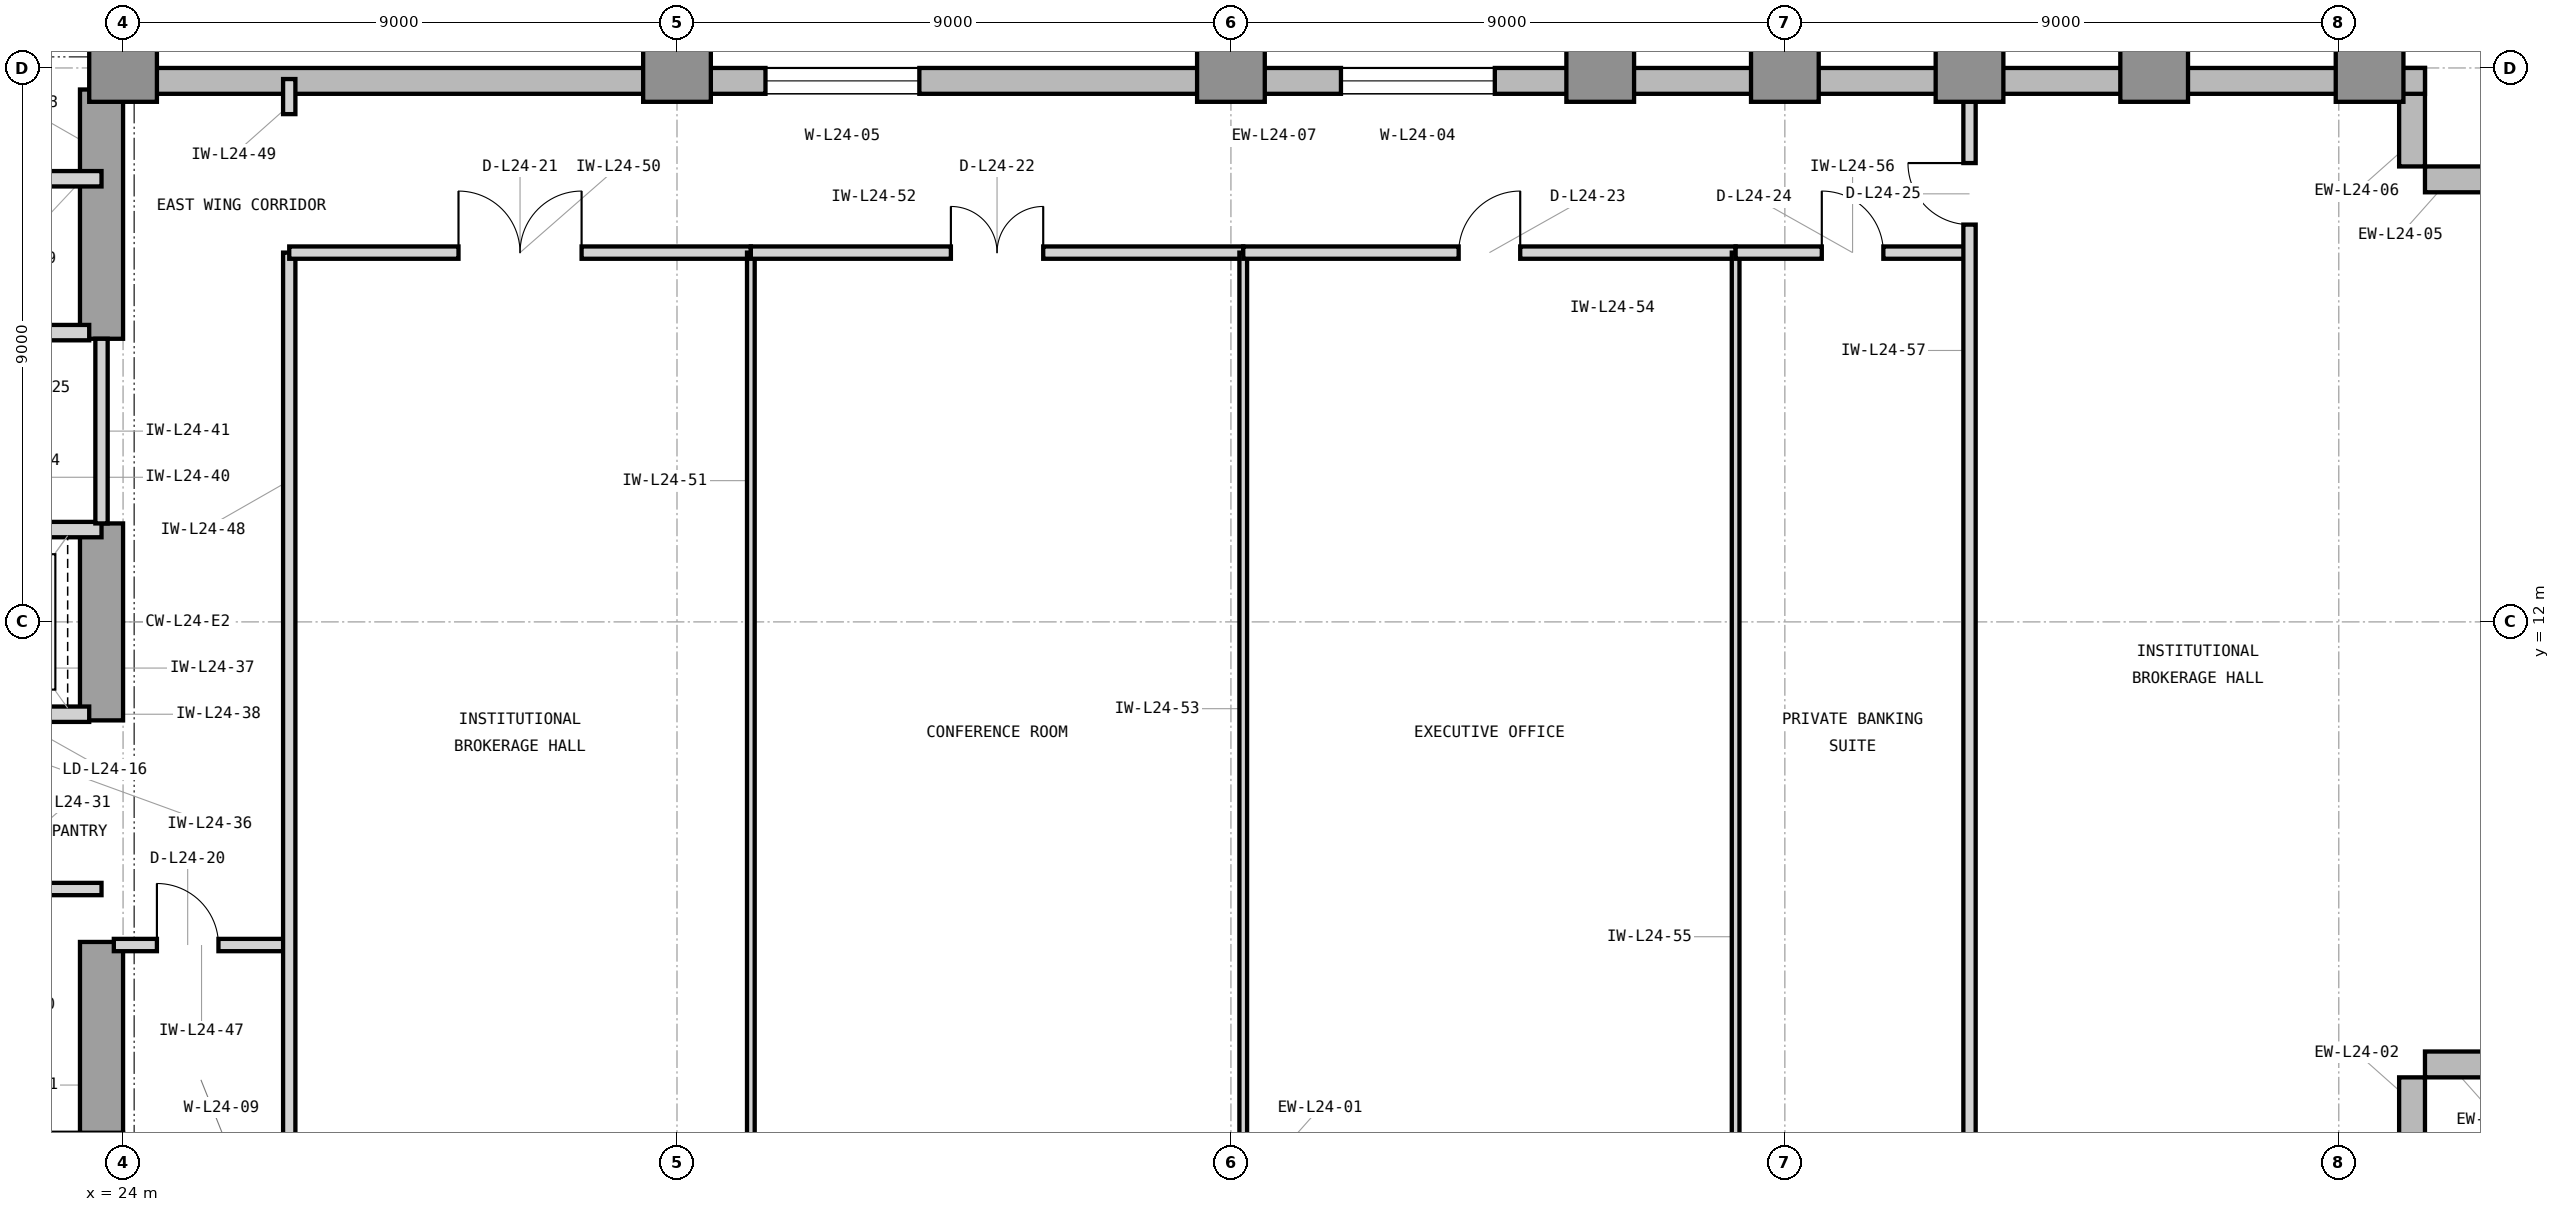
"""IFC4 building model, lengths in metres.
Left out: names, types, materials, properties, quantities, classifications, styles, units other than length and angle.
Written with IfcOpenShell. Run it as: python <this file> out.ifc"""

import sys

from ifc_helpers import new_model, si_unit, direction, frame, frame_2d, origin, origin_2d, place, context, subcontext, project, spatial, rectangle, extrude, element, fill, save


model = new_model("IFC4")
c1 = context("Model", 3, precision=1e-05, world=origin(), true_north=direction((0.0, 1.0)))
c2 = subcontext(c1, "Body", "Model", "MODEL_VIEW")
j1 = project(units=[si_unit("LENGTHUNIT", "METRE"), si_unit("PLANEANGLEUNIT", "RADIAN")], contexts=[c1])
p1 = place(None, origin())
s1 = spatial("IfcSite", under=j1, at=p1, CompositionType="ELEMENT")
p2 = place(p1, origin())
s2 = spatial("IfcBuilding", under=s1, at=p2, CompositionType="ELEMENT")
p3 = place(p2, frame((0.0, 0.0, 105.0)))
s3 = spatial("IfcBuildingStorey", under=s2, at=p3, CompositionType="ELEMENT", Elevation=105.0)
p4 = place(p3, frame((7.475, 3.35, 0.0), z_axis=(0.0, 0.0, 1.0), x_axis=(1.0, 0.0, 0.0)))
e1 = element("IfcWall", 1, at=p4, inside=s3, PredefinedType="SHEAR", context=c2, shape_type="SweptSolid", body=[
    extrude(rectangle(XDim=16.525, YDim=0.7, at=frame_2d((8.262, 0.0))), origin(), (0.0, 0.0, 1.0), 3.9),
])
p5 = place(p3, frame((23.65, 3.7, 0.0), z_axis=(0.0, 0.0, 1.0), x_axis=(0.0, 1.0, 0.0)))
e2 = element("IfcWall", 2, at=p5, inside=s3, PredefinedType="SHEAR", context=c2, shape_type="SweptSolid", body=[
    extrude(rectangle(XDim=3.1, YDim=0.7, at=frame_2d((1.55, 0.0))), origin(), (0.0, 0.0, 1.0), 3.9),
])
p6 = place(p3, frame((23.65, 10.4, 0.0), z_axis=(0.0, 0.0, 1.0), x_axis=(0.0, 1.0, 0.0)))
e3 = element("IfcWall", 3, at=p6, inside=s3, PredefinedType="SHEAR", context=c2, shape_type="SweptSolid", body=[
    extrude(rectangle(XDim=3.2, YDim=0.7, at=frame_2d((1.6, 0.0))), origin(), (0.0, 0.0, 1.0), 3.9),
])
p7 = place(p3, frame((23.65, 16.6, 0.0), z_axis=(0.0, 0.0, 1.0), x_axis=(0.0, 1.0, 0.0)))
e4 = element("IfcWall", 4, at=p7, inside=s3, PredefinedType="SHEAR", context=c2, shape_type="SweptSolid", body=[
    extrude(rectangle(XDim=4.05, YDim=0.7, at=frame_2d((2.025, 0.0))), origin(), (0.0, 0.0, 1.0), 3.9),
])
for number, where, z_axis, x_axis in (
    (5, (24.0, 21.0, 0.0), (0.0, 0.0, 1.0), (1.0, 0.0, 0.0)),
    (6, (33.0, 21.0, 0.0), (0.0, 0.0, 1.0), (1.0, 0.0, 0.0)),
    (7, (42.0, 21.0, 0.0), (0.0, 0.0, 1.0), (1.0, 0.0, 0.0)),
    (8, (48.0, 21.0, 0.0), (0.0, 0.0, 1.0), (1.0, 0.0, 0.0)),
    (9, (51.0, 21.0, 0.0), (0.0, 0.0, 1.0), (1.0, 0.0, 0.0)),
    (10, (54.0, 21.0, 0.0), (0.0, 0.0, 1.0), (1.0, 0.0, 0.0)),
    (11, (57.0, 21.0, 0.0), (0.0, 0.0, 1.0), (1.0, 0.0, 0.0)),
    (12, (60.5, 21.0, 0.0), (0.0, 0.0, 1.0), (1.0, 0.0, 0.0)),
):
    element("IfcColumn", number, at=place(p3, frame(where, z_axis=z_axis, x_axis=x_axis)), inside=s3, PredefinedType="COLUMN", context=c2, shape_type="SweptSolid", body=[
        extrude(rectangle(XDim=1.1, YDim=1.1, at=origin_2d()), origin(), (0.0, 0.0, 1.0), 3.9),
    ])
for number, where, z_axis, x_axis in (
    (13, (61.19, 3.0, 0.0), (0.0, 0.0, 1.0), (0.0, 1.0, 0.0)),
    (14, (61.4, 4.81, 0.0), (0.0, 0.0, 1.0), (1.0, 0.0, 0.0)),
    (15, (63.0, 19.19, 0.0), (0.0, 0.0, 1.0), (-1.0, 0.0, 0.0)),
    (16, (61.19, 19.4, 0.0), (0.0, 0.0, 1.0), (0.0, 1.0, 0.0)),
):
    element("IfcWall", number, at=place(p3, frame(where, z_axis=z_axis, x_axis=x_axis)), inside=s3, PredefinedType="STANDARD", context=c2, shape_type="SweptSolid", body=[
        extrude(rectangle(XDim=1.6, YDim=0.42, at=frame_2d((0.8, 0.0))), origin(), (0.0, 0.0, 1.0), 3.7),
    ])
p8 = place(p3, frame((61.4, 20.79, 0.0), z_axis=(0.0, 0.0, 1.0), x_axis=(-1.0, 0.0, 0.0)))
e17 = element("IfcWall", 17, at=p8, inside=s3, PredefinedType="STANDARD", context=c2, shape_type="SweptSolid", body=[
    extrude(rectangle(XDim=37.4, YDim=0.42, at=frame_2d((18.7, 0.0))), origin(), (0.0, 0.0, 1.0), 3.7),
])
p9 = place(p8, frame((15.113, 0.0, 0.85)))
e18 = element("IfcOpeningElement", 18, at=p9, cuts=e17, PredefinedType="OPENING", context=c2, shape_type="SweptSolid", body=[
    extrude(rectangle(XDim=2.5, YDim=2.25, at=frame_2d((1.25, 1.125))), frame((0.0, 0.22, 0.0), z_axis=(0.0, -1.0, 0.0), x_axis=(1.0, 0.0, 0.0)), (0.0, 0.0, 1.0), 0.44),
])
p10 = place(p8, frame((24.462, 0.0, 0.85)))
e19 = element("IfcOpeningElement", 19, at=p10, cuts=e17, PredefinedType="OPENING", context=c2, shape_type="SweptSolid", body=[
    extrude(rectangle(XDim=2.5, YDim=2.25, at=frame_2d((1.25, 1.125))), frame((0.0, 0.22, 0.0), z_axis=(0.0, -1.0, 0.0), x_axis=(1.0, 0.0, 0.0)), (0.0, 0.0, 1.0), 0.44),
])
p11 = place(p3, frame((23.79, 21.0, 0.0), z_axis=(0.0, 0.0, 1.0), x_axis=(0.0, 1.0, 0.0)))
e20 = element("IfcWall", 20, at=p11, inside=s3, PredefinedType="STANDARD", context=c2, shape_type="SweptSolid", body=[
    extrude(rectangle(XDim=25.4, YDim=0.42, at=frame_2d((12.7, 0.0))), origin(), (0.0, 0.0, 1.0), 3.7),
])
p12 = place(p11, frame((11.45, 0.0, 0.85)))
e21 = element("IfcOpeningElement", 21, at=p12, cuts=e20, PredefinedType="OPENING", context=c2, shape_type="SweptSolid", body=[
    extrude(rectangle(XDim=2.5, YDim=2.25, at=frame_2d((1.25, 1.125))), frame((0.0, 0.22, 0.0), z_axis=(0.0, -1.0, 0.0), x_axis=(1.0, 0.0, 0.0)), (0.0, 0.0, 1.0), 0.44),
])
p13 = place(p11, frame((18.866, 0.0, 0.85)))
e22 = element("IfcOpeningElement", 22, at=p13, cuts=e20, PredefinedType="OPENING", context=c2, shape_type="SweptSolid", body=[
    extrude(rectangle(XDim=1.2, YDim=2.25, at=frame_2d((0.6, 1.125))), frame((0.0, 0.22, 0.0), z_axis=(0.0, -1.0, 0.0), x_axis=(1.0, 0.0, 0.0)), (0.0, 0.0, 1.0), 0.44),
])
p14 = place(p3, frame((21.05, 16.7, 0.0), z_axis=(0.0, 0.0, 1.0), x_axis=(1.0, 0.0, 0.0)))
e23 = element("IfcWall", 23, at=p14, inside=s3, PredefinedType="PARTITIONING", context=c2, shape_type="SweptSolid", body=[
    extrude(rectangle(XDim=2.4, YDim=0.25, at=frame_2d((1.2, 0.0))), origin(), (0.0, 0.0, 1.0), 3.227),
])
p15 = place(p3, frame((16.45, 19.2, 0.0), z_axis=(0.0, 0.0, 1.0), x_axis=(1.0, 0.0, 0.0)))
e24 = element("IfcWall", 24, at=p15, inside=s3, PredefinedType="PARTITIONING", context=c2, shape_type="SweptSolid", body=[
    extrude(rectangle(XDim=7.2, YDim=0.25, at=frame_2d((3.6, 0.0))), origin(), (0.0, 0.0, 1.0), 3.69),
])
p16 = place(p3, frame((20.8, 7.66, 0.0), z_axis=(0.0, 0.0, 1.0), x_axis=(1.0, 0.0, 0.0)))
e25 = element("IfcWall", 25, at=p16, inside=s3, PredefinedType="PARTITIONING", context=c2, shape_type="SweptSolid", body=[
    extrude(rectangle(XDim=2.85, YDim=0.2, at=frame_2d((1.425, 0.0))), origin(), (0.0, 0.0, 1.0), 3.69),
])
p17 = place(p16, frame((0.95, 0.0, 0.0)))
e26 = element("IfcOpeningElement", 26, at=p17, cuts=e25, PredefinedType="OPENING", context=c2, shape_type="SweptSolid", body=[
    extrude(rectangle(XDim=0.95, YDim=2.1, at=frame_2d((0.475, 1.05))), frame((0.0, 0.11, 0.0), z_axis=(0.0, -1.0, 0.0), x_axis=(1.0, 0.0, 0.0)), (0.0, 0.0, 1.0), 0.22),
])
p18 = place(p3, frame((21.05, 10.5, 0.0), z_axis=(0.0, 0.0, 1.0), x_axis=(1.0, 0.0, 0.0)))
e27 = element("IfcWall", 27, at=p18, inside=s3, PredefinedType="PARTITIONING", context=c2, shape_type="SweptSolid", body=[
    extrude(rectangle(XDim=2.4, YDim=0.25, at=frame_2d((1.2, 0.0))), origin(), (0.0, 0.0, 1.0), 3.227),
])
p19 = place(p18, frame((0.48, 0.0, 0.0)))
e28 = element("IfcOpeningElement", 28, at=p19, cuts=e27, PredefinedType="OPENING", context=c2, shape_type="SweptSolid", body=[
    extrude(rectangle(XDim=1.15, YDim=2.25, at=frame_2d((0.575, 1.125))), frame((0.0, 0.135, 0.0), z_axis=(0.0, -1.0, 0.0), x_axis=(1.0, 0.0, 0.0)), (0.0, 0.0, 1.0), 0.27),
])
p20 = place(p3, frame((14.7, 13.5, 0.0), z_axis=(0.0, 0.0, 1.0), x_axis=(1.0, 0.0, 0.0)))
e29 = element("IfcWall", 29, at=p20, inside=s3, PredefinedType="PARTITIONING", context=c2, shape_type="SweptSolid", body=[
    extrude(rectangle(XDim=8.95, YDim=0.25, at=frame_2d((4.475, 0.0))), origin(), (0.0, 0.0, 1.0), 3.227),
])
p21 = place(p3, frame((23.65, 13.6, 0.0), z_axis=(0.0, 0.0, 1.0), x_axis=(0.0, 1.0, 0.0)))
e30 = element("IfcWall", 30, at=p21, inside=s3, PredefinedType="PARTITIONING", context=c2, shape_type="SweptSolid", body=[
    extrude(rectangle(XDim=3.0, YDim=0.2, at=frame_2d((1.5, 0.0))), origin(), (0.0, 0.0, 1.0), 3.69),
])
p22 = place(p3, frame((23.85, 6.75, 0.0), z_axis=(0.0, 0.0, 1.0), x_axis=(1.0, 0.0, 0.0)))
e31 = element("IfcWall", 31, at=p22, inside=s3, PredefinedType="PARTITIONING", context=c2, shape_type="SweptSolid", body=[
    extrude(rectangle(XDim=2.85, YDim=0.2, at=frame_2d((1.425, 0.0))), origin(), (0.0, 0.0, 1.0), 3.69),
])
p23 = place(p22, frame((0.7, 0.0, 0.0)))
e32 = element("IfcOpeningElement", 32, at=p23, cuts=e31, PredefinedType="OPENING", context=c2, shape_type="SweptSolid", body=[
    extrude(rectangle(XDim=1.0, YDim=2.15, at=frame_2d((0.5, 1.075))), frame((0.0, 0.11, 0.0), z_axis=(0.0, -1.0, 0.0), x_axis=(1.0, 0.0, 0.0)), (0.0, 0.0, 1.0), 0.22),
])
p24 = place(p3, frame((26.7, 3.18, 0.0), z_axis=(0.0, 0.0, 1.0), x_axis=(0.0, 1.0, 0.0)))
e33 = element("IfcWall", 33, at=p24, inside=s3, PredefinedType="PARTITIONING", context=c2, shape_type="SweptSolid", body=[
    extrude(rectangle(XDim=14.82, YDim=0.2, at=frame_2d((7.41, 0.0))), origin(), (0.0, 0.0, 1.0), 3.69),
])
p25 = place(p3, frame((26.7, 20.25, 0.0), z_axis=(0.0, 0.0, 1.0), x_axis=(0.0, 1.0, 0.0)))
e34 = element("IfcWall", 34, at=p25, inside=s3, PredefinedType="PARTITIONING", context=c2, shape_type="SweptSolid", body=[
    extrude(rectangle(XDim=0.57, YDim=0.2, at=frame_2d((0.285, 0.0))), origin(), (0.0, 0.0, 1.0), 3.69),
])
p26 = place(p3, frame((26.7, 18.0, 0.0), z_axis=(0.0, 0.0, 1.0), x_axis=(1.0, 0.0, 0.0)))
e35 = element("IfcWall", 35, at=p26, inside=s3, PredefinedType="PARTITIONING", context=c2, shape_type="SweptSolid", body=[
    extrude(rectangle(XDim=7.5, YDim=0.2, at=frame_2d((3.75, 0.0))), origin(), (0.0, 0.0, 1.0), 3.227),
])
p27 = place(p26, frame((2.75, 0.0, 0.0)))
e36 = element("IfcOpeningElement", 36, at=p27, cuts=e35, PredefinedType="OPENING", context=c2, shape_type="SweptSolid", body=[
    extrude(rectangle(XDim=2.0, YDim=2.5, at=frame_2d((1.0, 1.25))), frame((0.0, 0.11, 0.0), z_axis=(0.0, -1.0, 0.0), x_axis=(1.0, 0.0, 0.0)), (0.0, 0.0, 1.0), 0.22),
])
p28 = place(p3, frame((34.2, 3.18, 0.0), z_axis=(0.0, 0.0, 1.0), x_axis=(0.0, 1.0, 0.0)))
e37 = element("IfcWall", 37, at=p28, inside=s3, PredefinedType="PARTITIONING", context=c2, shape_type="SweptSolid", body=[
    extrude(rectangle(XDim=14.82, YDim=0.125, at=frame_2d((7.41, 0.0))), origin(), (0.0, 0.0, 1.0), 3.69),
])
p29 = place(p3, frame((34.2, 18.0, 0.0), z_axis=(0.0, 0.0, 1.0), x_axis=(1.0, 0.0, 0.0)))
e38 = element("IfcWall", 38, at=p29, inside=s3, PredefinedType="PARTITIONING", context=c2, shape_type="SweptSolid", body=[
    extrude(rectangle(XDim=8.0, YDim=0.2, at=frame_2d((4.0, 0.0))), origin(), (0.0, 0.0, 1.0), 3.227),
])
p30 = place(p29, frame((3.25, 0.0, 0.0)))
e39 = element("IfcOpeningElement", 39, at=p30, cuts=e38, PredefinedType="OPENING", context=c2, shape_type="SweptSolid", body=[
    extrude(rectangle(XDim=1.5, YDim=2.3, at=frame_2d((0.75, 1.15))), frame((0.0, 0.11, 0.0), z_axis=(0.0, -1.0, 0.0), x_axis=(1.0, 0.0, 0.0)), (0.0, 0.0, 1.0), 0.22),
])
p31 = place(p3, frame((42.2, 3.18, 0.0), z_axis=(0.0, 0.0, 1.0), x_axis=(0.0, 1.0, 0.0)))
e40 = element("IfcWall", 40, at=p31, inside=s3, PredefinedType="PARTITIONING", context=c2, shape_type="SweptSolid", body=[
    extrude(rectangle(XDim=14.82, YDim=0.125, at=frame_2d((7.41, 0.0))), origin(), (0.0, 0.0, 1.0), 3.69),
])
p32 = place(p3, frame((42.2, 18.0, 0.0), z_axis=(0.0, 0.0, 1.0), x_axis=(1.0, 0.0, 0.0)))
e41 = element("IfcWall", 41, at=p32, inside=s3, PredefinedType="PARTITIONING", context=c2, shape_type="SweptSolid", body=[
    extrude(rectangle(XDim=8.0, YDim=0.2, at=frame_2d((4.0, 0.0))), origin(), (0.0, 0.0, 1.0), 3.227),
])
p33 = place(p32, frame((3.5, 0.0, 0.0)))
e42 = element("IfcOpeningElement", 42, at=p33, cuts=e41, PredefinedType="OPENING", context=c2, shape_type="SweptSolid", body=[
    extrude(rectangle(XDim=1.0, YDim=2.15, at=frame_2d((0.5, 1.075))), frame((0.0, 0.11, 0.0), z_axis=(0.0, -1.0, 0.0), x_axis=(1.0, 0.0, 0.0)), (0.0, 0.0, 1.0), 0.22),
])
p34 = place(p3, frame((50.2, 3.18, 0.0), z_axis=(0.0, 0.0, 1.0), x_axis=(0.0, 1.0, 0.0)))
e43 = element("IfcWall", 43, at=p34, inside=s3, PredefinedType="PARTITIONING", context=c2, shape_type="SweptSolid", body=[
    extrude(rectangle(XDim=14.82, YDim=0.125, at=frame_2d((7.41, 0.0))), origin(), (0.0, 0.0, 1.0), 3.69),
])
p35 = place(p3, frame((50.2, 18.0, 0.0), z_axis=(0.0, 0.0, 1.0), x_axis=(1.0, 0.0, 0.0)))
e44 = element("IfcWall", 44, at=p35, inside=s3, PredefinedType="PARTITIONING", context=c2, shape_type="SweptSolid", body=[
    extrude(rectangle(XDim=3.8, YDim=0.2, at=frame_2d((1.9, 0.0))), origin(), (0.0, 0.0, 1.0), 3.227),
])
p36 = place(p35, frame((1.4, 0.0, 0.0)))
e45 = element("IfcOpeningElement", 45, at=p36, cuts=e44, PredefinedType="OPENING", context=c2, shape_type="SweptSolid", body=[
    extrude(rectangle(XDim=1.0, YDim=2.15, at=frame_2d((0.5, 1.075))), frame((0.0, 0.11, 0.0), z_axis=(0.0, -1.0, 0.0), x_axis=(1.0, 0.0, 0.0)), (0.0, 0.0, 1.0), 0.22),
])
p37 = place(p3, frame((54.0, 3.18, 0.0), z_axis=(0.0, 0.0, 1.0), x_axis=(0.0, 1.0, 0.0)))
e46 = element("IfcWall", 46, at=p37, inside=s3, PredefinedType="PARTITIONING", context=c2, shape_type="SweptSolid", body=[
    extrude(rectangle(XDim=17.64, YDim=0.2, at=frame_2d((8.82, 0.0))), origin(), (0.0, 0.0, 1.0), 2.917),
])
p38 = place(p37, frame((15.275, 0.0, 0.0)))
e47 = element("IfcOpeningElement", 47, at=p38, cuts=e46, PredefinedType="OPENING", context=c2, shape_type="SweptSolid", body=[
    extrude(rectangle(XDim=1.0, YDim=2.15, at=frame_2d((0.5, 1.075))), frame((0.0, 0.11, 0.0), z_axis=(0.0, -1.0, 0.0), x_axis=(1.0, 0.0, 0.0)), (0.0, 0.0, 1.0), 0.22),
])
p39 = place(p9, origin())
e48 = element("IfcWindow", 48, at=p39, inside=s3, PartitioningType="SINGLE_PANEL", PredefinedType="WINDOW", context=c2, shape_type="SweptSolid", body=[
    extrude(rectangle(XDim=2.5, YDim=2.25, at=frame_2d((1.25, 1.125))), frame((0.0, 0.11, 0.0), z_axis=(0.0, -1.0, 0.0), x_axis=(1.0, 0.0, 0.0)), (0.0, 0.0, 1.0), 0.06),
])
fill(e18, e48)
p40 = place(p10, origin())
e49 = element("IfcWindow", 49, at=p40, inside=s3, PartitioningType="SINGLE_PANEL", PredefinedType="WINDOW", context=c2, shape_type="SweptSolid", body=[
    extrude(rectangle(XDim=2.5, YDim=2.25, at=frame_2d((1.25, 1.125))), frame((0.0, 0.11, 0.0), z_axis=(0.0, -1.0, 0.0), x_axis=(1.0, 0.0, 0.0)), (0.0, 0.0, 1.0), 0.06),
])
fill(e19, e49)
p41 = place(p23, origin())
e50 = element("IfcDoor", 50, at=p41, inside=s3, OperationType="SINGLE_SWING_LEFT", PredefinedType="DOOR", context=c2, shape_type="SweptSolid", body=[
    extrude(rectangle(XDim=1.0, YDim=2.15, at=frame_2d((0.5, 1.075))), frame((0.0, 0.025, 0.0), z_axis=(0.0, -1.0, 0.0), x_axis=(1.0, 0.0, 0.0)), (0.0, 0.0, 1.0), 0.05),
])
fill(e32, e50)
p42 = place(p27, origin())
e51 = element("IfcDoor", 51, at=p42, inside=s3, OperationType="DOUBLE_DOOR_SINGLE_SWING", PredefinedType="DOOR", context=c2, shape_type="SweptSolid", body=[
    extrude(rectangle(XDim=2.0, YDim=2.5, at=frame_2d((1.0, 1.25))), frame((0.0, 0.025, 0.0), z_axis=(0.0, -1.0, 0.0), x_axis=(1.0, 0.0, 0.0)), (0.0, 0.0, 1.0), 0.05),
])
fill(e36, e51)
p43 = place(p30, origin())
e52 = element("IfcDoor", 52, at=p43, inside=s3, OperationType="DOUBLE_DOOR_SINGLE_SWING", PredefinedType="DOOR", context=c2, shape_type="SweptSolid", body=[
    extrude(rectangle(XDim=1.5, YDim=2.3, at=frame_2d((0.75, 1.15))), frame((0.0, 0.025, 0.0), z_axis=(0.0, -1.0, 0.0), x_axis=(1.0, 0.0, 0.0)), (0.0, 0.0, 1.0), 0.05),
])
fill(e39, e52)
p44 = place(p33, origin())
e53 = element("IfcDoor", 53, at=p44, inside=s3, OperationType="SINGLE_SWING_RIGHT", PredefinedType="DOOR", context=c2, shape_type="SweptSolid", body=[
    extrude(rectangle(XDim=1.0, YDim=2.15, at=frame_2d((0.5, 1.075))), frame((0.0, 0.025, 0.0), z_axis=(0.0, -1.0, 0.0), x_axis=(1.0, 0.0, 0.0)), (0.0, 0.0, 1.0), 0.05),
])
fill(e42, e53)
p45 = place(p36, origin())
e54 = element("IfcDoor", 54, at=p45, inside=s3, OperationType="SINGLE_SWING_LEFT", PredefinedType="DOOR", context=c2, shape_type="SweptSolid", body=[
    extrude(rectangle(XDim=1.0, YDim=2.15, at=frame_2d((0.5, 1.075))), frame((0.0, 0.025, 0.0), z_axis=(0.0, -1.0, 0.0), x_axis=(1.0, 0.0, 0.0)), (0.0, 0.0, 1.0), 0.05),
])
fill(e45, e54)
p46 = place(p38, origin())
e55 = element("IfcDoor", 55, at=p46, inside=s3, OperationType="SINGLE_SWING_RIGHT", PredefinedType="DOOR", context=c2, shape_type="SweptSolid", body=[
    extrude(rectangle(XDim=1.0, YDim=2.15, at=frame_2d((0.5, 1.075))), frame((0.0, 0.025, 0.0), z_axis=(0.0, -1.0, 0.0), x_axis=(1.0, 0.0, 0.0)), (0.0, 0.0, 1.0), 0.05),
])
fill(e47, e55)
save(model, sys.argv[1])
